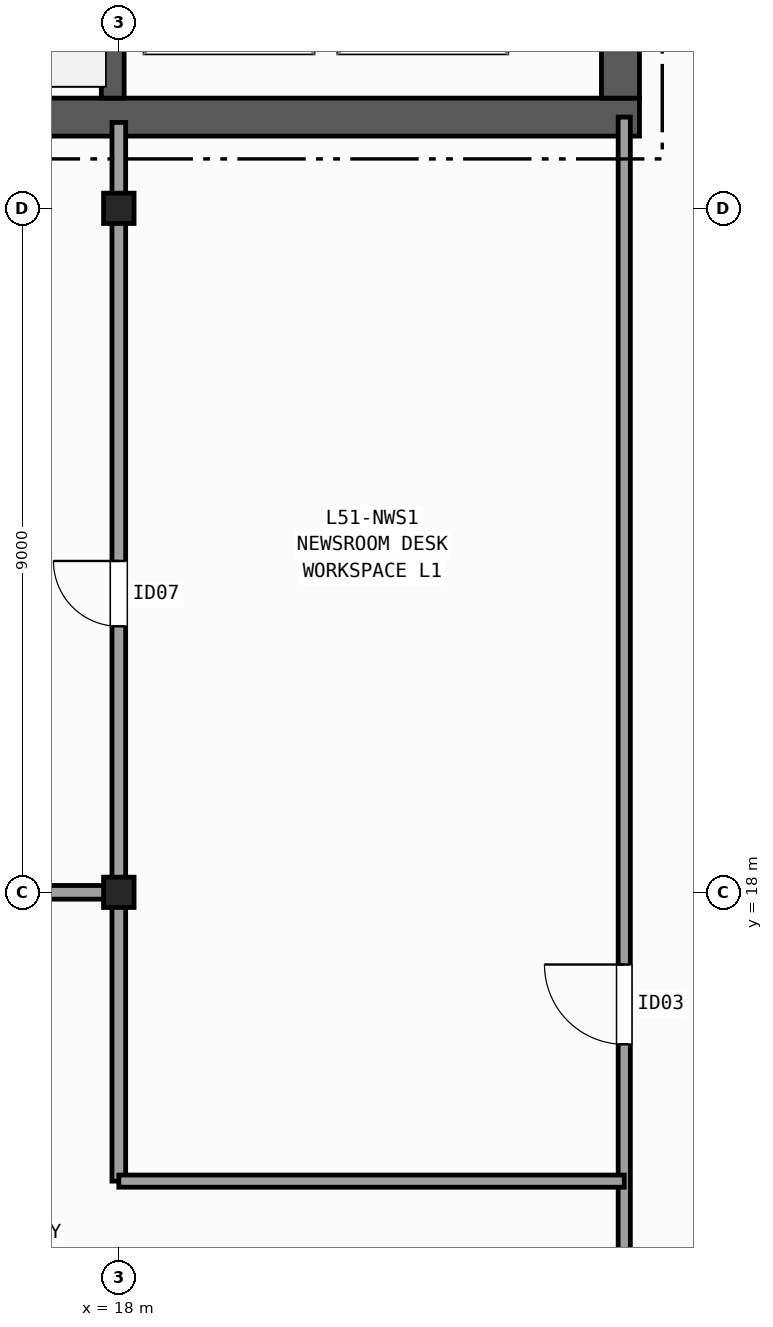
"""IFC4 building model, lengths in metres.
Left out: names, types, materials, properties, quantities, classifications, styles, units other than length and angle.
Written with IfcOpenShell. Run it as: python <this file> out.ifc"""

import sys

from ifc_helpers import new_model, si_unit, direction, frame, frame_2d, origin, origin_2d, place, context, subcontext, project, spatial, rectangle, i_section, extrude, element, fill, save


model = new_model("IFC4")
c1 = context("Model", 3, precision=1e-05, world=origin(), true_north=direction((0.0, 1.0)))
c2 = subcontext(c1, "Body", "Model", "MODEL_VIEW")
j1 = project(units=[si_unit("LENGTHUNIT", "METRE"), si_unit("PLANEANGLEUNIT", "RADIAN")], contexts=[c1])
p1 = place(None, origin())
s1 = spatial("IfcSite", under=j1, at=p1, CompositionType="ELEMENT")
p2 = place(p1, origin())
s2 = spatial("IfcBuilding", under=s1, at=p2, CompositionType="ELEMENT")
p3 = place(p2, frame((0.0, 0.0, 206.2)))
s3 = spatial("IfcBuildingStorey", under=s2, at=p3, CompositionType="ELEMENT", Elevation=206.2)
for number, where, z_axis, x_axis in (
    (1, (18.0, 18.0, 0.0), (0.0, 0.0, 1.0), (1.0, 0.0, 0.0)),
    (2, (18.0, 27.0, 0.0), (0.0, 0.0, 1.0), (1.0, 0.0, 0.0)),
):
    element("IfcColumn", number, at=place(p3, frame(where, z_axis=z_axis, x_axis=x_axis)), inside=s3, PredefinedType="COLUMN", context=c2, shape_type="SweptSolid", body=[
        extrude(i_section(OverallWidth=0.401, OverallDepth=0.399, WebThickness=0.025, FlangeThickness=0.04, FilletRadius=0.015, at=origin_2d()), origin(), (0.0, 0.0, 1.0), 3.7),
    ])
p4 = place(p3, frame((10.95, 28.2, 0.0), z_axis=(0.0, 0.0, 1.0), x_axis=(1.0, 0.0, 0.0)))
e3 = element("IfcWall", 3, at=p4, inside=s3, PredefinedType="SHEAR", context=c2, shape_type="SweptSolid", body=[
    extrude(rectangle(XDim=13.9, YDim=0.5, at=frame_2d((6.95, 0.0))), origin(), (0.0, 0.0, 1.0), 3.42),
])
p5 = place(p3, frame((24.6, 28.45, 0.0), z_axis=(0.0, 0.0, 1.0), x_axis=(0.0, 1.0, 0.0)))
e4 = element("IfcWall", 4, at=p5, inside=s3, PredefinedType="SHEAR", context=c2, shape_type="SweptSolid", body=[
    extrude(rectangle(XDim=13.7, YDim=0.5, at=frame_2d((6.85, 0.0))), origin(), (0.0, 0.0, 1.0), 3.42),
])
p6 = place(p5, frame((3.35, 0.0, 0.0)))
e5 = element("IfcOpeningElement", 5, at=p6, cuts=e4, PredefinedType="OPENING", context=c2, shape_type="SweptSolid", body=[
    extrude(rectangle(XDim=1.5, YDim=2.2, at=frame_2d((0.75, 1.1))), frame((0.0, 0.26, 0.0), z_axis=(0.0, -1.0, 0.0), x_axis=(1.0, 0.0, 0.0)), (0.0, 0.0, 1.0), 0.52),
])
p7 = place(p5, frame((9.95, 0.0, 0.0)))
e6 = element("IfcOpeningElement", 6, at=p7, cuts=e4, PredefinedType="OPENING", context=c2, shape_type="SweptSolid", body=[
    extrude(rectangle(XDim=0.9, YDim=2.1, at=frame_2d((0.45, 1.05))), frame((0.0, 0.26, 0.0), z_axis=(0.0, -1.0, 0.0), x_axis=(1.0, 0.0, 0.0)), (0.0, 0.0, 1.0), 0.52),
])
p8 = place(p5, frame((12.05, 0.0, 0.0)))
e7 = element("IfcOpeningElement", 7, at=p8, cuts=e4, PredefinedType="OPENING", context=c2, shape_type="SweptSolid", body=[
    extrude(rectangle(XDim=0.9, YDim=2.1, at=frame_2d((0.45, 1.05))), frame((0.0, 0.26, 0.0), z_axis=(0.0, -1.0, 0.0), x_axis=(1.0, 0.0, 0.0)), (0.0, 0.0, 1.0), 0.52),
])
p9 = place(p3, frame((17.92, 42.15, 0.0), z_axis=(0.0, 0.0, 1.0), x_axis=(0.0, -1.0, 0.0)))
e8 = element("IfcWall", 8, at=p9, inside=s3, PredefinedType="SHEAR", context=c2, shape_type="SweptSolid", body=[
    extrude(rectangle(XDim=13.7, YDim=0.3, at=frame_2d((6.85, 0.0))), origin(), (0.0, 0.0, 1.0), 3.42),
])
p10 = place(p9, frame((1.975, 0.0, 0.0)))
e9 = element("IfcOpeningElement", 9, at=p10, cuts=e8, PredefinedType="OPENING", context=c2, shape_type="SweptSolid", body=[
    extrude(rectangle(XDim=1.15, YDim=2.15, at=frame_2d((0.575, 1.075))), frame((0.0, 0.16, 0.0), z_axis=(0.0, -1.0, 0.0), x_axis=(1.0, 0.0, 0.0)), (0.0, 0.0, 1.0), 0.32),
])
p11 = place(p3, frame((24.65, 9.0, 0.0), z_axis=(0.0, 0.0, 1.0), x_axis=(0.0, 1.0, 0.0)))
e10 = element("IfcWall", 10, at=p11, inside=s3, PredefinedType="PARTITIONING", context=c2, shape_type="SweptSolid", body=[
    extrude(rectangle(XDim=19.2, YDim=0.16, at=frame_2d((9.6, 0.0))), origin(), (0.0, 0.0, 1.0), 2.707),
])
p12 = place(p11, frame((7.0, 0.0, 0.0)))
e11 = element("IfcOpeningElement", 11, at=p12, cuts=e10, PredefinedType="OPENING", context=c2, shape_type="SweptSolid", body=[
    extrude(rectangle(XDim=1.05, YDim=2.15, at=frame_2d((0.525, 1.075))), frame((0.0, 0.09, 0.0), z_axis=(0.0, -1.0, 0.0), x_axis=(1.0, 0.0, 0.0)), (0.0, 0.0, 1.0), 0.18),
])
p13 = place(p11, frame((2.55, 0.0, 0.0)))
e12 = element("IfcOpeningElement", 12, at=p13, cuts=e10, PredefinedType="OPENING", context=c2, shape_type="SweptSolid", body=[
    extrude(rectangle(XDim=1.2, YDim=2.15, at=frame_2d((0.6, 1.075))), frame((0.0, 0.09, 0.0), z_axis=(0.0, -1.0, 0.0), x_axis=(1.0, 0.0, 0.0)), (0.0, 0.0, 1.0), 0.18),
])
p14 = place(p3, frame((9.0, 18.0, 0.0), z_axis=(0.0, 0.0, 1.0), x_axis=(1.0, 0.0, 0.0)))
e13 = element("IfcWall", 13, at=p14, inside=s3, PredefinedType="PARTITIONING", context=c2, shape_type="SweptSolid", body=[
    extrude(rectangle(XDim=9.08, YDim=0.18, at=frame_2d((4.54, 0.0))), origin(), (0.0, 0.0, 1.0), 2.707),
])
p15 = place(p14, frame((6.0, 0.0, 0.0)))
e14 = element("IfcOpeningElement", 14, at=p15, cuts=e13, PredefinedType="OPENING", context=c2, shape_type="SweptSolid", body=[
    extrude(rectangle(XDim=1.0, YDim=2.1, at=frame_2d((0.5, 1.05))), frame((0.0, 0.1, 0.0), z_axis=(0.0, -1.0, 0.0), x_axis=(1.0, 0.0, 0.0)), (0.0, 0.0, 1.0), 0.2),
])
p16 = place(p3, frame((18.0, 14.2, 0.0), z_axis=(0.0, 0.0, 1.0), x_axis=(0.0, 1.0, 0.0)))
e15 = element("IfcWall", 15, at=p16, inside=s3, PredefinedType="PARTITIONING", context=c2, shape_type="SweptSolid", body=[
    extrude(rectangle(XDim=13.93, YDim=0.18, at=frame_2d((6.965, 0.0))), origin(), (0.0, 0.0, 1.0), 2.789),
])
p17 = place(p16, frame((7.3, 0.0, 0.0)))
e16 = element("IfcOpeningElement", 16, at=p17, cuts=e15, PredefinedType="OPENING", context=c2, shape_type="SweptSolid", body=[
    extrude(rectangle(XDim=0.86, YDim=2.05, at=frame_2d((0.43, 1.025))), frame((0.0, 0.1, 0.0), z_axis=(0.0, -1.0, 0.0), x_axis=(1.0, 0.0, 0.0)), (0.0, 0.0, 1.0), 0.2),
])
p18 = place(p3, frame((18.0, 14.2, 0.0), z_axis=(0.0, 0.0, 1.0), x_axis=(1.0, 0.0, 0.0)))
e17 = element("IfcWall", 17, at=p18, inside=s3, PredefinedType="PARTITIONING", context=c2, shape_type="SweptSolid", body=[
    extrude(rectangle(XDim=6.65, YDim=0.16, at=frame_2d((3.325, 0.0))), origin(), (0.0, 0.0, 1.0), 2.789),
])
p19 = place(p12, origin())
e18 = element("IfcDoor", 18, at=p19, inside=s3, OperationType="SINGLE_SWING_RIGHT", PredefinedType="DOOR", context=c2, shape_type="SweptSolid", body=[
    extrude(rectangle(XDim=1.05, YDim=2.15, at=frame_2d((0.525, 1.075))), frame((0.0, 0.025, 0.0), z_axis=(0.0, -1.0, 0.0), x_axis=(1.0, 0.0, 0.0)), (0.0, 0.0, 1.0), 0.05),
])
fill(e11, e18)
p20 = place(p17, origin())
e19 = element("IfcDoor", 19, at=p20, inside=s3, OperationType="SINGLE_SWING_RIGHT", PredefinedType="DOOR", context=c2, shape_type="SweptSolid", body=[
    extrude(rectangle(XDim=0.86, YDim=2.05, at=frame_2d((0.43, 1.025))), frame((0.0, 0.025, 0.0), z_axis=(0.0, -1.0, 0.0), x_axis=(1.0, 0.0, 0.0)), (0.0, 0.0, 1.0), 0.05),
])
fill(e16, e19)
save(model, sys.argv[1])
